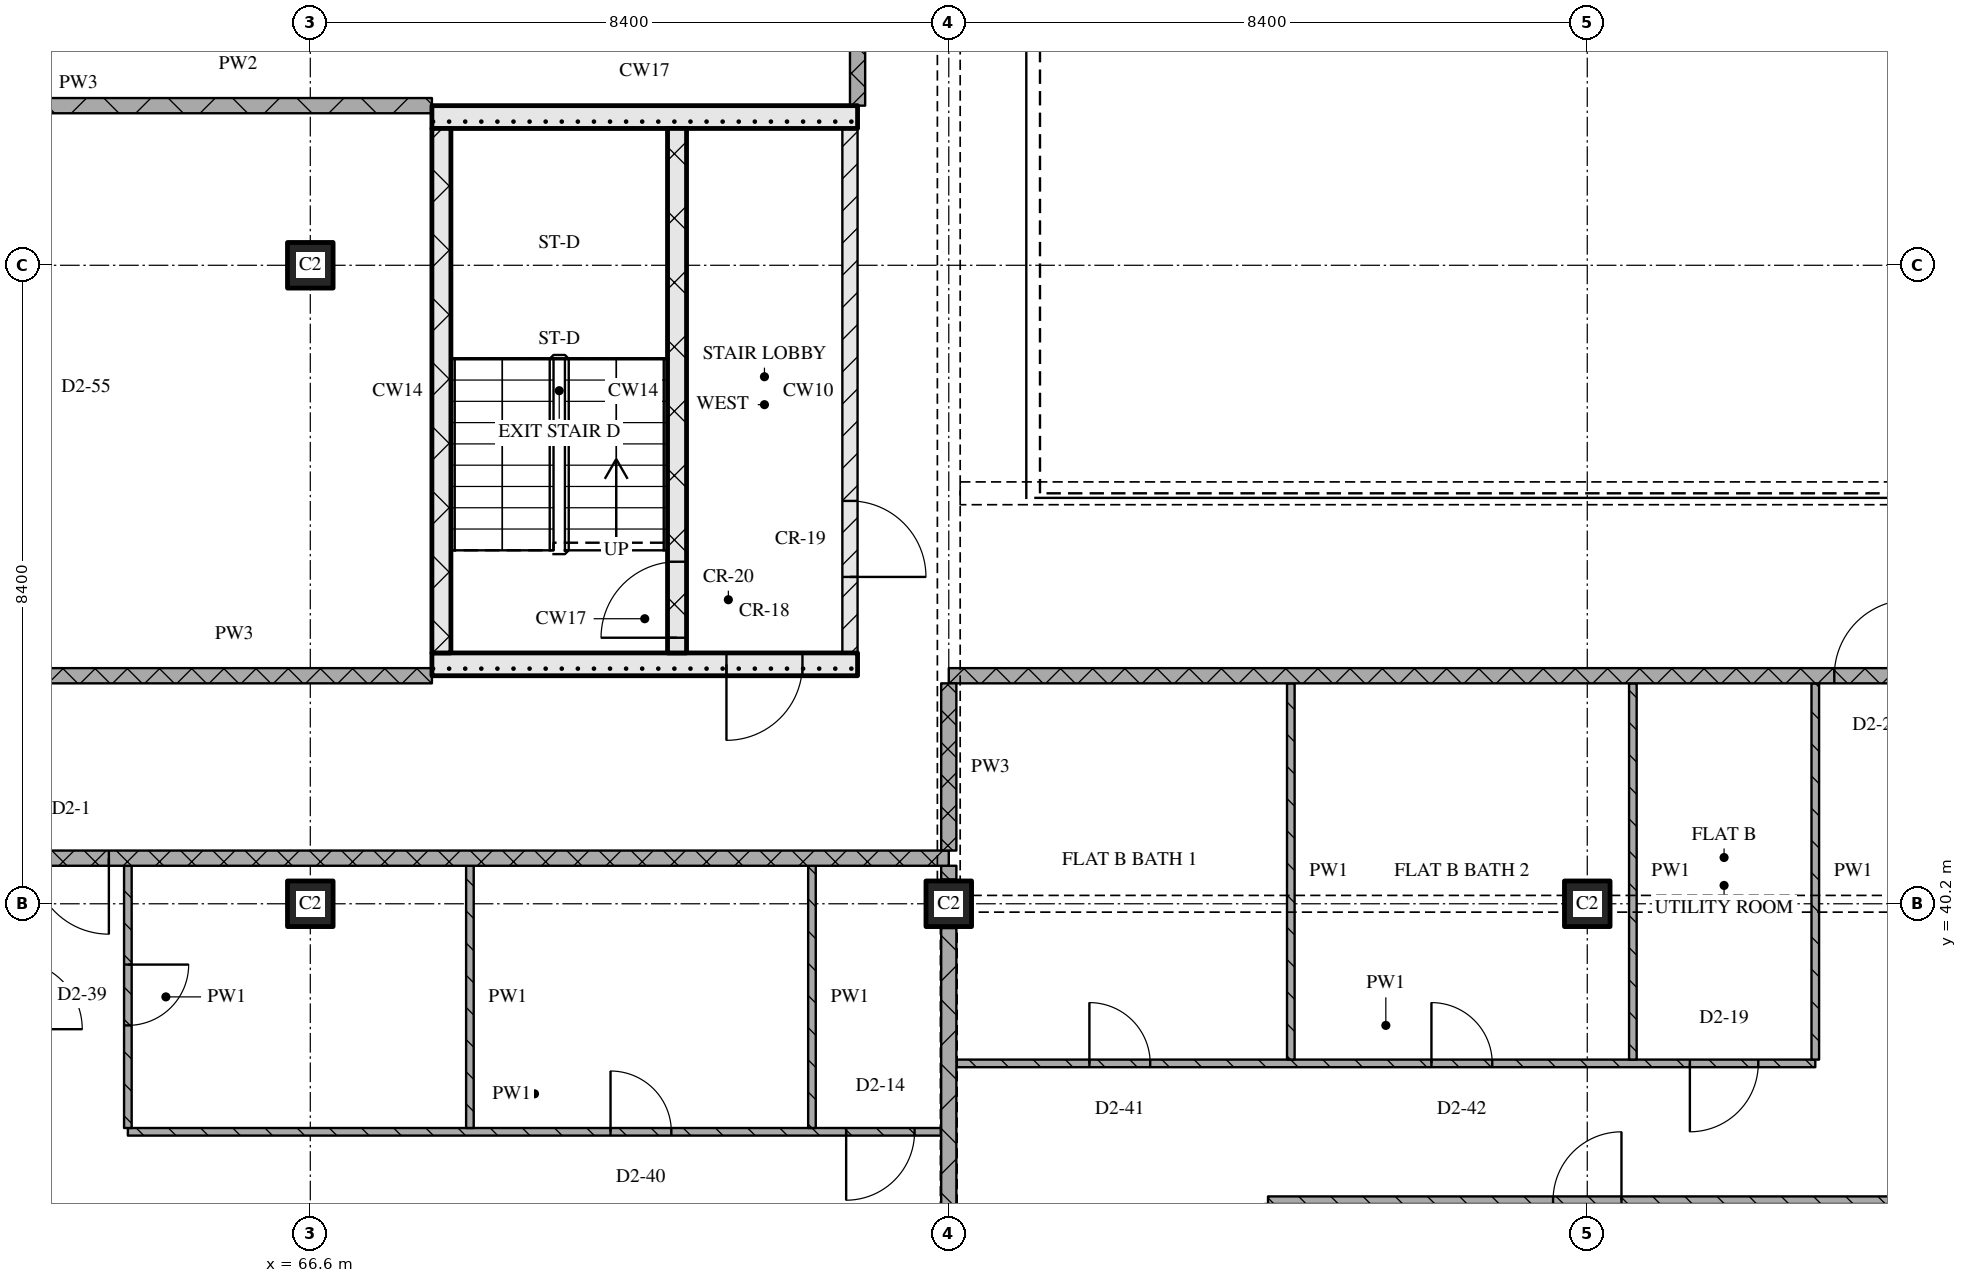
"""IFC4 building model, lengths in metres.
Left out: names, types, materials, properties, quantities, classifications, styles, units other than length and angle.
Written with IfcOpenShell. Run it as: python <this file> out.ifc"""

import sys

from ifc_helpers import new_model, si_unit, direction, frame, frame_2d, origin, origin_2d, place, context, subcontext, project, spatial, rectangle, extrude, element, fill, save


model = new_model("IFC4")
c1 = context("Model", 3, precision=1e-05, world=origin(), true_north=direction((0.0, 1.0)))
c2 = subcontext(c1, "Body", "Model", "MODEL_VIEW")
j1 = project(units=[si_unit("LENGTHUNIT", "METRE"), si_unit("PLANEANGLEUNIT", "RADIAN")], contexts=[c1])
p1 = place(None, origin())
s1 = spatial("IfcSite", under=j1, at=p1, CompositionType="ELEMENT")
p2 = place(p1, origin())
s2 = spatial("IfcBuilding", under=s1, at=p2, CompositionType="ELEMENT")
p3 = place(p2, frame((0.0, 0.0, 219.9)))
s3 = spatial("IfcBuildingStorey", under=s2, at=p3, CompositionType="ELEMENT", Elevation=219.9)
for number, where, z_axis, x_axis in (
    (1, (66.6, 40.2, 0.0), (0.0, 0.0, 1.0), (1.0, 0.0, 0.0)),
    (2, (66.6, 48.6, 0.0), (0.0, 0.0, 1.0), (1.0, 0.0, 0.0)),
    (3, (75.0, 40.2, 0.0), (0.0, 0.0, 1.0), (1.0, 0.0, 0.0)),
    (4, (83.4, 40.2, 0.0), (0.0, 0.0, 1.0), (1.0, 0.0, 0.0)),
):
    element("IfcColumn", number, at=place(p3, frame(where, z_axis=z_axis, x_axis=x_axis)), inside=s3, PredefinedType="COLUMN", context=c2, shape_type="SweptSolid", body=[
        extrude(rectangle(XDim=0.6, YDim=0.6, at=origin_2d()), origin(), (0.0, 0.0, 1.0), 3.6),
    ])
p4 = place(p3, frame((68.2, 43.35, 0.0), z_axis=(0.0, 0.0, 1.0), x_axis=(1.0, 0.0, 0.0)))
e5 = element("IfcWall", 5, at=p4, inside=s3, PredefinedType="SOLIDWALL", context=c2, shape_type="SweptSolid", body=[
    extrude(rectangle(XDim=5.6, YDim=0.3, at=frame_2d((2.8, 0.0))), origin(), (0.0, 0.0, 1.0), 3.32),
])
p5 = place(p4, frame((3.875, 0.0, 0.0)))
e6 = element("IfcOpeningElement", 6, at=p5, cuts=e5, PredefinedType="OPENING", context=c2, shape_type="SweptSolid", body=[
    extrude(rectangle(XDim=1.0, YDim=2.1, at=frame_2d((0.5, 1.05))), frame((0.0, 0.16, 0.0), z_axis=(0.0, -1.0, 0.0), x_axis=(1.0, 0.0, 0.0)), (0.0, 0.0, 1.0), 0.32),
])
p6 = place(p3, frame((68.325, 43.5, 0.0), z_axis=(0.0, 0.0, 1.0), x_axis=(0.0, 1.0, 0.0)))
e7 = element("IfcWall", 7, at=p6, inside=s3, PredefinedType="SOLIDWALL", context=c2, shape_type="SweptSolid", body=[
    extrude(rectangle(XDim=6.9, YDim=0.25, at=frame_2d((3.45, 0.0))), origin(), (0.0, 0.0, 1.0), 3.32),
])
p7 = place(p3, frame((71.425, 43.5, 0.0), z_axis=(0.0, 0.0, 1.0), x_axis=(0.0, 1.0, 0.0)))
e8 = element("IfcWall", 8, at=p7, inside=s3, PredefinedType="SOLIDWALL", context=c2, shape_type="SweptSolid", body=[
    extrude(rectangle(XDim=6.9, YDim=0.25, at=frame_2d((3.45, 0.0))), origin(), (0.0, 0.0, 1.0), 3.32),
])
p8 = place(p7, frame((0.2, 0.0, 0.0)))
e9 = element("IfcOpeningElement", 9, at=p8, cuts=e8, PredefinedType="OPENING", context=c2, shape_type="SweptSolid", body=[
    extrude(rectangle(XDim=1.0, YDim=2.1, at=frame_2d((0.5, 1.05))), frame((0.0, 0.135, 0.0), z_axis=(0.0, -1.0, 0.0), x_axis=(1.0, 0.0, 0.0)), (0.0, 0.0, 1.0), 0.27),
])
p9 = place(p3, frame((73.7, 43.5, 0.0), z_axis=(0.0, 0.0, 1.0), x_axis=(0.0, 1.0, 0.0)))
e10 = element("IfcWall", 10, at=p9, inside=s3, PredefinedType="PARTITIONING", context=c2, shape_type="SweptSolid", body=[
    extrude(rectangle(XDim=6.9, YDim=0.2, at=frame_2d((3.45, 0.0))), origin(), (0.0, 0.0, 1.0), 3.32),
])
p10 = place(p9, frame((1.0, 0.0, 0.0)))
e11 = element("IfcOpeningElement", 11, at=p10, cuts=e10, PredefinedType="OPENING", context=c2, shape_type="SweptSolid", body=[
    extrude(rectangle(XDim=1.0, YDim=2.1, at=frame_2d((0.5, 1.05))), frame((0.0, 0.11, 0.0), z_axis=(0.0, -1.0, 0.0), x_axis=(1.0, 0.0, 0.0)), (0.0, 0.0, 1.0), 0.22),
])
p11 = place(p3, frame((68.2, 50.55, 0.0), z_axis=(0.0, 0.0, 1.0), x_axis=(1.0, 0.0, 0.0)))
e12 = element("IfcWall", 12, at=p11, inside=s3, PredefinedType="SOLIDWALL", context=c2, shape_type="SweptSolid", body=[
    extrude(rectangle(XDim=5.6, YDim=0.3, at=frame_2d((2.8, 0.0))), origin(), (0.0, 0.0, 1.0), 3.32),
])
p12 = place(p3, frame((64.2, 37.2, 0.0), z_axis=(0.0, 0.0, 1.0), x_axis=(1.0, 0.0, 0.0)))
e13 = element("IfcWall", 13, at=p12, inside=s3, PredefinedType="PARTITIONING", context=c2, shape_type="SweptSolid", body=[
    extrude(rectangle(XDim=10.7, YDim=0.1, at=frame_2d((5.35, 0.0))), origin(), (0.0, 0.0, 1.0), 3.32),
])
p13 = place(p12, frame((6.35, 0.0, 0.0)))
e14 = element("IfcOpeningElement", 14, at=p13, cuts=e13, PredefinedType="OPENING", context=c2, shape_type="SweptSolid", body=[
    extrude(rectangle(XDim=0.8, YDim=2.1, at=frame_2d((0.4, 1.05))), frame((0.0, 0.06, 0.0), z_axis=(0.0, -1.0, 0.0), x_axis=(1.0, 0.0, 0.0)), (0.0, 0.0, 1.0), 0.12),
])
p14 = place(p12, frame((9.45, 0.0, 0.0)))
e15 = element("IfcOpeningElement", 15, at=p14, cuts=e13, PredefinedType="OPENING", context=c2, shape_type="SweptSolid", body=[
    extrude(rectangle(XDim=0.9, YDim=2.1, at=frame_2d((0.45, 1.05))), frame((0.0, 0.06, 0.0), z_axis=(0.0, -1.0, 0.0), x_axis=(1.0, 0.0, 0.0)), (0.0, 0.0, 1.0), 0.12),
])
p15 = place(p3, frame((75.1, 38.1, 0.0), z_axis=(0.0, 0.0, 1.0), x_axis=(1.0, 0.0, 0.0)))
e16 = element("IfcWall", 16, at=p15, inside=s3, PredefinedType="PARTITIONING", context=c2, shape_type="SweptSolid", body=[
    extrude(rectangle(XDim=11.3, YDim=0.1, at=frame_2d((5.65, 0.0))), origin(), (0.0, 0.0, 1.0), 3.32),
])
p16 = place(p15, frame((1.75, 0.0, 0.0)))
e17 = element("IfcOpeningElement", 17, at=p16, cuts=e16, PredefinedType="OPENING", context=c2, shape_type="SweptSolid", body=[
    extrude(rectangle(XDim=0.8, YDim=2.1, at=frame_2d((0.4, 1.05))), frame((0.0, 0.06, 0.0), z_axis=(0.0, -1.0, 0.0), x_axis=(1.0, 0.0, 0.0)), (0.0, 0.0, 1.0), 0.12),
])
p17 = place(p15, frame((6.25, 0.0, 0.0)))
e18 = element("IfcOpeningElement", 18, at=p17, cuts=e16, PredefinedType="OPENING", context=c2, shape_type="SweptSolid", body=[
    extrude(rectangle(XDim=0.8, YDim=2.1, at=frame_2d((0.4, 1.05))), frame((0.0, 0.06, 0.0), z_axis=(0.0, -1.0, 0.0), x_axis=(1.0, 0.0, 0.0)), (0.0, 0.0, 1.0), 0.12),
])
p18 = place(p15, frame((9.65, 0.0, 0.0)))
e19 = element("IfcOpeningElement", 19, at=p18, cuts=e16, PredefinedType="OPENING", context=c2, shape_type="SweptSolid", body=[
    extrude(rectangle(XDim=0.9, YDim=2.1, at=frame_2d((0.45, 1.05))), frame((0.0, 0.06, 0.0), z_axis=(0.0, -1.0, 0.0), x_axis=(1.0, 0.0, 0.0)), (0.0, 0.0, 1.0), 0.12),
])
p19 = place(p3, frame((75.0, 40.8, 0.0), z_axis=(0.0, 0.0, 1.0), x_axis=(-1.0, 0.0, 0.0)))
e20 = element("IfcWall", 20, at=p19, inside=s3, PredefinedType="PARTITIONING", context=c2, shape_type="SweptSolid", body=[
    extrude(rectangle(XDim=24.38, YDim=0.2, at=frame_2d((12.19, 0.0))), origin(), (0.0, 0.0, 1.0), 3.32),
])
p20 = place(p19, frame((11.05, 0.0, 0.0)))
e21 = element("IfcOpeningElement", 21, at=p20, cuts=e20, PredefinedType="OPENING", context=c2, shape_type="SweptSolid", body=[
    extrude(rectangle(XDim=1.0, YDim=2.1, at=frame_2d((0.5, 1.05))), frame((0.0, 0.11, 0.0), z_axis=(0.0, -1.0, 0.0), x_axis=(1.0, 0.0, 0.0)), (0.0, 0.0, 1.0), 0.22),
])
p21 = place(p3, frame((63.0, 43.2, 0.0), z_axis=(0.0, 0.0, 1.0), x_axis=(1.0, 0.0, 0.0)))
e22 = element("IfcWall", 22, at=p21, inside=s3, PredefinedType="PARTITIONING", context=c2, shape_type="SweptSolid", body=[
    extrude(rectangle(XDim=5.2, YDim=0.2, at=frame_2d((2.6, 0.0))), origin(), (0.0, 0.0, 1.0), 3.32),
])
p22 = place(p3, frame((100.2, 43.2, 0.0), z_axis=(0.0, 0.0, 1.0), x_axis=(-1.0, 0.0, 0.0)))
e23 = element("IfcWall", 23, at=p22, inside=s3, PredefinedType="PARTITIONING", context=c2, shape_type="SweptSolid", body=[
    extrude(rectangle(XDim=25.2, YDim=0.2, at=frame_2d((12.6, 0.0))), origin(), (0.0, 0.0, 1.0), 3.32),
])
p23 = place(p22, frame((12.55, 0.0, 0.0)))
e24 = element("IfcOpeningElement", 24, at=p23, cuts=e23, PredefinedType="OPENING", context=c2, shape_type="SweptSolid", body=[
    extrude(rectangle(XDim=1.0, YDim=2.1, at=frame_2d((0.5, 1.05))), frame((0.0, 0.11, 0.0), z_axis=(0.0, -1.0, 0.0), x_axis=(1.0, 0.0, 0.0)), (0.0, 0.0, 1.0), 0.22),
])
p24 = place(p3, frame((63.1, 50.7, 0.0), z_axis=(0.0, 0.0, 1.0), x_axis=(1.0, 0.0, 0.0)))
e25 = element("IfcWall", 25, at=p24, inside=s3, PredefinedType="PARTITIONING", context=c2, shape_type="SweptSolid", body=[
    extrude(rectangle(XDim=5.1, YDim=0.2, at=frame_2d((2.55, 0.0))), origin(), (0.0, 0.0, 1.0), 3.32),
])
p25 = place(p3, frame((64.2, 40.7, 0.0), z_axis=(0.0, 0.0, 1.0), x_axis=(0.0, -1.0, 0.0)))
e26 = element("IfcWall", 26, at=p25, inside=s3, PredefinedType="PARTITIONING", context=c2, shape_type="SweptSolid", body=[
    extrude(rectangle(XDim=3.45, YDim=0.1, at=frame_2d((1.725, 0.0))), origin(), (0.0, 0.0, 1.0), 3.32),
])
p26 = place(p25, frame((1.3, 0.0, 0.0)))
e27 = element("IfcOpeningElement", 27, at=p26, cuts=e26, PredefinedType="OPENING", context=c2, shape_type="SweptSolid", body=[
    extrude(rectangle(XDim=0.8, YDim=2.1, at=frame_2d((0.4, 1.05))), frame((0.0, 0.06, 0.0), z_axis=(0.0, -1.0, 0.0), x_axis=(1.0, 0.0, 0.0)), (0.0, 0.0, 1.0), 0.12),
])
for number, where, z_axis, x_axis in (
    (28, (68.7, 40.7, 0.0), (0.0, 0.0, 1.0), (0.0, -1.0, 0.0)),
    (29, (73.2, 40.7, 0.0), (0.0, 0.0, 1.0), (0.0, -1.0, 0.0)),
):
    element("IfcWall", number, at=place(p3, frame(where, z_axis=z_axis, x_axis=x_axis)), inside=s3, PredefinedType="PARTITIONING", context=c2, shape_type="SweptSolid", body=[
        extrude(rectangle(XDim=3.45, YDim=0.1, at=frame_2d((1.725, 0.0))), origin(), (0.0, 0.0, 1.0), 3.32),
    ])
p27 = place(p3, frame((73.8, 58.7, 0.0), z_axis=(0.0, 0.0, 1.0), x_axis=(0.0, -1.0, 0.0)))
e30 = element("IfcWall", 30, at=p27, inside=s3, PredefinedType="PARTITIONING", context=c2, shape_type="SweptSolid", body=[
    extrude(rectangle(XDim=8.0, YDim=0.2, at=frame_2d((4.0, 0.0))), origin(), (0.0, 0.0, 1.0), 3.32),
])
p28 = place(p27, frame((1.225, 0.0, 0.9)))
e31 = element("IfcOpeningElement", 31, at=p28, cuts=e30, PredefinedType="OPENING", context=c2, shape_type="SweptSolid", body=[
    extrude(rectangle(XDim=1.5, YDim=1.5, at=frame_2d((0.75, 0.75))), frame((0.0, 0.11, 0.0), z_axis=(0.0, -1.0, 0.0), x_axis=(1.0, 0.0, 0.0)), (0.0, 0.0, 1.0), 0.22),
])
p29 = place(p3, frame((75.0, 43.1, 0.0), z_axis=(0.0, 0.0, 1.0), x_axis=(0.0, -1.0, 0.0)))
e32 = element("IfcWall", 32, at=p29, inside=s3, PredefinedType="PARTITIONING", context=c2, shape_type="SweptSolid", body=[
    extrude(rectangle(XDim=2.2, YDim=0.2, at=frame_2d((1.1, 0.0))), origin(), (0.0, 0.0, 1.0), 2.53),
])
p30 = place(p3, frame((75.0, 39.88, 0.0), z_axis=(0.0, 0.0, 1.0), x_axis=(0.0, -1.0, 0.0)))
e33 = element("IfcWall", 33, at=p30, inside=s3, PredefinedType="PARTITIONING", context=c2, shape_type="SweptSolid", body=[
    extrude(rectangle(XDim=7.76, YDim=0.2, at=frame_2d((3.88, 0.0))), origin(), (0.0, 0.0, 1.0), 2.72),
])
p31 = place(p3, frame((75.0, 40.7, 0.0), z_axis=(0.0, 0.0, 1.0), x_axis=(0.0, -1.0, 0.0)))
e34 = element("IfcWall", 34, at=p31, inside=s3, PredefinedType="PARTITIONING", context=c2, shape_type="SweptSolid", body=[
    extrude(rectangle(XDim=0.18, YDim=0.2, at=frame_2d((0.09, 0.0))), origin(), (0.0, 0.0, 1.0), 3.32),
])
p32 = place(p3, frame((79.2, 36.25, 0.0), z_axis=(0.0, 0.0, 1.0), x_axis=(0.0, -1.0, 0.0)))
e35 = element("IfcWall", 35, at=p32, inside=s3, PredefinedType="PARTITIONING", context=c2, shape_type="SweptSolid", body=[
    extrude(rectangle(XDim=5.97, YDim=0.1, at=frame_2d((2.985, 0.0))), origin(), (0.0, 0.0, 1.0), 3.32),
])
for number, where, z_axis, x_axis in (
    (36, (79.5, 43.1, 0.0), (0.0, 0.0, 1.0), (0.0, -1.0, 0.0)),
    (37, (84.0, 43.1, 0.0), (0.0, 0.0, 1.0), (0.0, -1.0, 0.0)),
    (38, (86.4, 43.1, 0.0), (0.0, 0.0, 1.0), (0.0, -1.0, 0.0)),
):
    element("IfcWall", number, at=place(p3, frame(where, z_axis=z_axis, x_axis=x_axis)), inside=s3, PredefinedType="PARTITIONING", context=c2, shape_type="SweptSolid", body=[
        extrude(rectangle(XDim=4.95, YDim=0.1, at=frame_2d((2.475, 0.0))), origin(), (0.0, 0.0, 1.0), 3.32),
    ])
p33 = place(p3, frame((100.1, 36.3, 0.0), z_axis=(0.0, 0.0, 1.0), x_axis=(-1.0, 0.0, 0.0)))
e39 = element("IfcWall", 39, at=p33, inside=s3, PredefinedType="PARTITIONING", context=c2, shape_type="SweptSolid", body=[
    extrude(rectangle(XDim=20.9, YDim=0.1, at=frame_2d((10.45, 0.0))), origin(), (0.0, 0.0, 1.0), 3.32),
])
p34 = place(p33, frame((1.55, 0.0, 0.0)))
e40 = element("IfcOpeningElement", 40, at=p34, cuts=e39, PredefinedType="OPENING", context=c2, shape_type="SweptSolid", body=[
    extrude(rectangle(XDim=0.9, YDim=2.1, at=frame_2d((0.45, 1.05))), frame((0.0, 0.06, 0.0), z_axis=(0.0, -1.0, 0.0), x_axis=(1.0, 0.0, 0.0)), (0.0, 0.0, 1.0), 0.12),
])
p35 = place(p33, frame((7.85, 0.0, 0.0)))
e41 = element("IfcOpeningElement", 41, at=p35, cuts=e39, PredefinedType="OPENING", context=c2, shape_type="SweptSolid", body=[
    extrude(rectangle(XDim=0.9, YDim=2.1, at=frame_2d((0.45, 1.05))), frame((0.0, 0.06, 0.0), z_axis=(0.0, -1.0, 0.0), x_axis=(1.0, 0.0, 0.0)), (0.0, 0.0, 1.0), 0.12),
])
p36 = place(p33, frame((16.25, 0.0, 0.0)))
e42 = element("IfcOpeningElement", 42, at=p36, cuts=e39, PredefinedType="OPENING", context=c2, shape_type="SweptSolid", body=[
    extrude(rectangle(XDim=0.9, YDim=2.1, at=frame_2d((0.45, 1.05))), frame((0.0, 0.06, 0.0), z_axis=(0.0, -1.0, 0.0), x_axis=(1.0, 0.0, 0.0)), (0.0, 0.0, 1.0), 0.12),
])
p37 = place(p5, origin())
e43 = element("IfcDoor", 43, at=p37, inside=s3, OperationType="SINGLE_SWING_RIGHT", PredefinedType="DOOR", context=c2, shape_type="SweptSolid", body=[
    extrude(rectangle(XDim=1.0, YDim=2.1, at=frame_2d((0.5, 1.05))), frame((0.0, 0.025, 0.0), z_axis=(0.0, -1.0, 0.0), x_axis=(1.0, 0.0, 0.0)), (0.0, 0.0, 1.0), 0.05),
])
fill(e6, e43)
p38 = place(p8, origin())
e44 = element("IfcDoor", 44, at=p38, inside=s3, OperationType="SINGLE_SWING_LEFT", PredefinedType="DOOR", context=c2, shape_type="SweptSolid", body=[
    extrude(rectangle(XDim=1.0, YDim=2.1, at=frame_2d((0.5, 1.05))), frame((0.0, 0.025, 0.0), z_axis=(0.0, -1.0, 0.0), x_axis=(1.0, 0.0, 0.0)), (0.0, 0.0, 1.0), 0.05),
])
fill(e9, e44)
p39 = place(p10, origin())
e45 = element("IfcDoor", 45, at=p39, inside=s3, OperationType="SINGLE_SWING_RIGHT", PredefinedType="DOOR", context=c2, shape_type="SweptSolid", body=[
    extrude(rectangle(XDim=1.0, YDim=2.1, at=frame_2d((0.5, 1.05))), frame((0.0, 0.025, 0.0), z_axis=(0.0, -1.0, 0.0), x_axis=(1.0, 0.0, 0.0)), (0.0, 0.0, 1.0), 0.05),
])
fill(e11, e45)
p40 = place(p13, origin())
e46 = element("IfcDoor", 46, at=p40, inside=s3, OperationType="SINGLE_SWING_LEFT", PredefinedType="DOOR", context=c2, shape_type="SweptSolid", body=[
    extrude(rectangle(XDim=0.8, YDim=2.1, at=frame_2d((0.4, 1.05))), frame((0.0, 0.025, 0.0), z_axis=(0.0, -1.0, 0.0), x_axis=(1.0, 0.0, 0.0)), (0.0, 0.0, 1.0), 0.05),
])
fill(e14, e46)
p41 = place(p14, origin())
e47 = element("IfcDoor", 47, at=p41, inside=s3, OperationType="SINGLE_SWING_RIGHT", PredefinedType="DOOR", context=c2, shape_type="SweptSolid", body=[
    extrude(rectangle(XDim=0.9, YDim=2.1, at=frame_2d((0.45, 1.05))), frame((0.0, 0.025, 0.0), z_axis=(0.0, -1.0, 0.0), x_axis=(1.0, 0.0, 0.0)), (0.0, 0.0, 1.0), 0.05),
])
fill(e15, e47)
p42 = place(p16, origin())
e48 = element("IfcDoor", 48, at=p42, inside=s3, OperationType="SINGLE_SWING_LEFT", PredefinedType="DOOR", context=c2, shape_type="SweptSolid", body=[
    extrude(rectangle(XDim=0.8, YDim=2.1, at=frame_2d((0.4, 1.05))), frame((0.0, 0.025, 0.0), z_axis=(0.0, -1.0, 0.0), x_axis=(1.0, 0.0, 0.0)), (0.0, 0.0, 1.0), 0.05),
])
fill(e17, e48)
p43 = place(p17, origin())
e49 = element("IfcDoor", 49, at=p43, inside=s3, OperationType="SINGLE_SWING_LEFT", PredefinedType="DOOR", context=c2, shape_type="SweptSolid", body=[
    extrude(rectangle(XDim=0.8, YDim=2.1, at=frame_2d((0.4, 1.05))), frame((0.0, 0.025, 0.0), z_axis=(0.0, -1.0, 0.0), x_axis=(1.0, 0.0, 0.0)), (0.0, 0.0, 1.0), 0.05),
])
fill(e18, e49)
p44 = place(p18, origin())
e50 = element("IfcDoor", 50, at=p44, inside=s3, OperationType="SINGLE_SWING_RIGHT", PredefinedType="DOOR", context=c2, shape_type="SweptSolid", body=[
    extrude(rectangle(XDim=0.9, YDim=2.1, at=frame_2d((0.45, 1.05))), frame((0.0, 0.025, 0.0), z_axis=(0.0, -1.0, 0.0), x_axis=(1.0, 0.0, 0.0)), (0.0, 0.0, 1.0), 0.05),
])
fill(e19, e50)
p45 = place(p20, origin())
e51 = element("IfcDoor", 51, at=p45, inside=s3, OperationType="SINGLE_SWING_LEFT", PredefinedType="DOOR", context=c2, shape_type="SweptSolid", body=[
    extrude(rectangle(XDim=1.0, YDim=2.1, at=frame_2d((0.5, 1.05))), frame((0.0, 0.025, 0.0), z_axis=(0.0, -1.0, 0.0), x_axis=(1.0, 0.0, 0.0)), (0.0, 0.0, 1.0), 0.05),
])
fill(e21, e51)
p46 = place(p23, origin())
e52 = element("IfcDoor", 52, at=p46, inside=s3, OperationType="SINGLE_SWING_RIGHT", PredefinedType="DOOR", context=c2, shape_type="SweptSolid", body=[
    extrude(rectangle(XDim=1.0, YDim=2.1, at=frame_2d((0.5, 1.05))), frame((0.0, 0.025, 0.0), z_axis=(0.0, -1.0, 0.0), x_axis=(1.0, 0.0, 0.0)), (0.0, 0.0, 1.0), 0.05),
])
fill(e24, e52)
p47 = place(p26, origin())
e53 = element("IfcDoor", 53, at=p47, inside=s3, OperationType="SINGLE_SWING_LEFT", PredefinedType="DOOR", context=c2, shape_type="SweptSolid", body=[
    extrude(rectangle(XDim=0.8, YDim=2.1, at=frame_2d((0.4, 1.05))), frame((0.0, 0.025, 0.0), z_axis=(0.0, -1.0, 0.0), x_axis=(1.0, 0.0, 0.0)), (0.0, 0.0, 1.0), 0.05),
])
fill(e27, e53)
p48 = place(p36, origin())
e54 = element("IfcDoor", 54, at=p48, inside=s3, OperationType="SINGLE_SWING_RIGHT", PredefinedType="DOOR", context=c2, shape_type="SweptSolid", body=[
    extrude(rectangle(XDim=0.9, YDim=2.1, at=frame_2d((0.45, 1.05))), frame((0.0, 0.025, 0.0), z_axis=(0.0, -1.0, 0.0), x_axis=(1.0, 0.0, 0.0)), (0.0, 0.0, 1.0), 0.05),
])
fill(e42, e54)
save(model, sys.argv[1])
